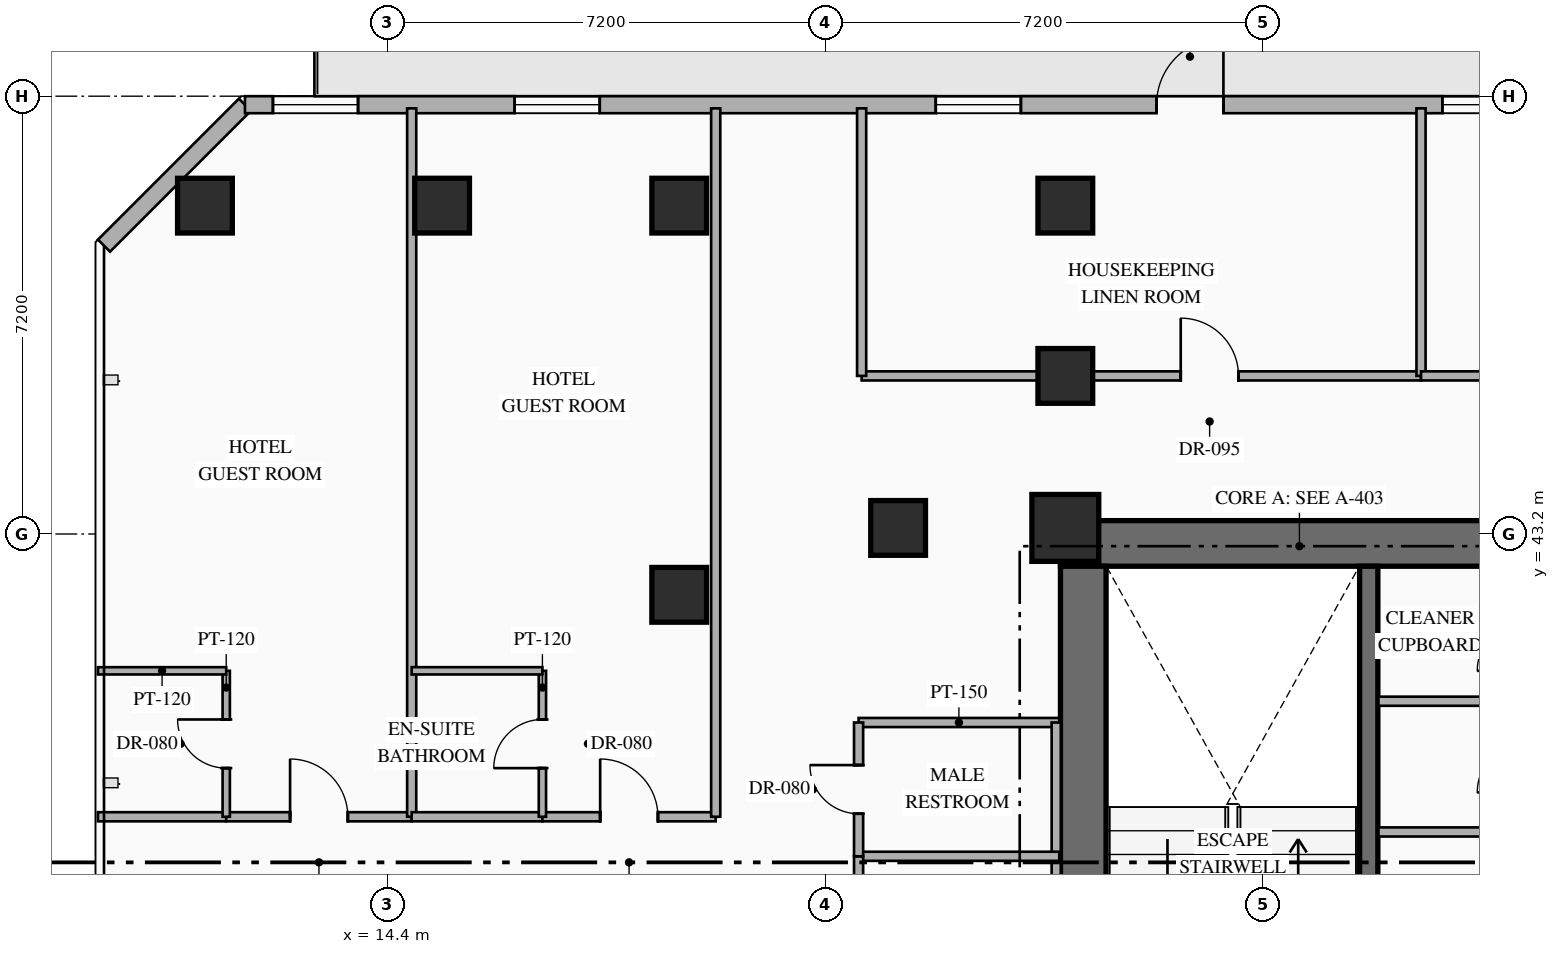
"""IFC4 building model, lengths in metres.
Left out: names, types, materials, properties, quantities, classifications, styles, units other than length and angle.
Written with IfcOpenShell. Run it as: python <this file> out.ifc"""

import sys

from ifc_helpers import new_model, si_unit, direction, frame, frame_2d, origin, origin_2d, place, context, subcontext, project, spatial, rectangle, hollow_rectangle, extrude, element, fill, save


model = new_model("IFC4")
c1 = context("Model", 3, precision=1e-05, world=origin(), true_north=direction((0.0, 1.0)))
c2 = subcontext(c1, "Body", "Model", "MODEL_VIEW")
j1 = project(units=[si_unit("LENGTHUNIT", "METRE"), si_unit("PLANEANGLEUNIT", "RADIAN")], contexts=[c1])
p1 = place(None, origin())
s1 = spatial("IfcSite", under=j1, at=p1, CompositionType="ELEMENT")
p2 = place(p1, origin())
s2 = spatial("IfcBuilding", under=s1, at=p2, CompositionType="ELEMENT")
p3 = place(p2, frame((0.0, 0.0, 81.3)))
s3 = spatial("IfcBuildingStorey", under=s2, at=p3, CompositionType="ELEMENT", Elevation=81.3)
p4 = place(p3, frame((25.47, 43.045, 0.0), z_axis=(0.0, 0.0, 1.0), x_axis=(1.0, 0.0, 0.0)))
e1 = element("IfcWall", 1, at=p4, inside=s3, PredefinedType="SHEAR", context=c2, shape_type="SweptSolid", body=[
    extrude(rectangle(XDim=8.08, YDim=0.75, at=frame_2d((4.04, 0.0))), origin(), (0.0, 0.0, 1.0), 3.35),
])
p5 = place(p3, frame((25.845, 33.19, 0.0), z_axis=(0.0, 0.0, 1.0), x_axis=(0.0, 1.0, 0.0)))
e2 = element("IfcWall", 2, at=p5, inside=s3, PredefinedType="SHEAR", context=c2, shape_type="SweptSolid", body=[
    extrude(rectangle(XDim=9.48, YDim=0.75, at=frame_2d((4.74, 0.0))), origin(), (0.0, 0.0, 1.0), 3.35),
])
p6 = place(p3, frame((30.54, 33.19, 0.0), z_axis=(0.0, 0.0, 1.0), x_axis=(0.0, 1.0, 0.0)))
e3 = element("IfcWall", 3, at=p6, inside=s3, PredefinedType="SHEAR", context=c2, shape_type="SweptSolid", body=[
    extrude(rectangle(XDim=9.48, YDim=0.3, at=frame_2d((4.74, 0.0))), origin(), (0.0, 0.0, 1.0), 3.35),
])
p7 = place(p3, frame((25.55, 43.3, 0.0), z_axis=(0.0, 0.0, 1.0), x_axis=(1.0, 0.0, 0.0)))
e4 = element("IfcColumn", 4, at=p7, inside=s3, PredefinedType="COLUMN", context=c2, shape_type="SweptSolid", body=[
    extrude(rectangle(XDim=1.1, YDim=1.1, at=origin_2d()), origin(), (0.0, 0.0, 1.0), 3.35),
])
for number, where, z_axis, x_axis in (
    (5, (25.55, 45.8, 0.0), (0.0, 0.0, 1.0), (1.0, 0.0, 0.0)),
    (6, (11.4, 48.6, 0.0), (0.0, 0.0, 1.0), (1.0, 0.0, 0.0)),
    (7, (19.2, 48.6, 0.0), (0.0, 0.0, 1.0), (1.0, 0.0, 0.0)),
    (8, (25.55, 48.6, 0.0), (0.0, 0.0, 1.0), (1.0, 0.0, 0.0)),
    (9, (19.2, 42.2, 0.0), (0.0, 0.0, 1.0), (1.0, 0.0, 0.0)),
    (10, (22.8, 43.3, 0.0), (0.0, 0.0, 1.0), (1.0, 0.0, 0.0)),
    (11, (15.3, 48.6, 0.0), (0.0, 0.0, 1.0), (1.0, 0.0, 0.0)),
):
    element("IfcColumn", number, at=place(p3, frame(where, z_axis=z_axis, x_axis=x_axis)), inside=s3, PredefinedType="COLUMN", context=c2, shape_type="SweptSolid", body=[
        extrude(hollow_rectangle(XDim=0.9, YDim=0.9, WallThickness=0.036, at=origin_2d()), origin(), (0.0, 0.0, 1.0), 3.35),
    ])
p8 = place(p3, frame((9.74, 47.942, 0.0), z_axis=(0.0, 0.0, 1.0), x_axis=(0.707106781187, 0.707106781187, 0.0)))
e12 = element("IfcWall", 12, at=p8, inside=s3, PredefinedType="STANDARD", context=c2, shape_type="SweptSolid", body=[
    extrude(rectangle(XDim=3.278, YDim=0.28, at=frame_2d((1.639, 0.0))), origin(), (0.0, 0.0, 1.0), 3.13),
])
p9 = place(p3, frame((12.058, 50.26, 0.0), z_axis=(0.0, 0.0, 1.0), x_axis=(1.0, 0.0, 0.0)))
e13 = element("IfcWall", 13, at=p9, inside=s3, PredefinedType="STANDARD", context=c2, shape_type="SweptSolid", body=[
    extrude(rectangle(XDim=30.484, YDim=0.28, at=frame_2d((15.242, 0.0))), origin(), (0.0, 0.0, 1.0), 3.13),
])
p10 = place(p9, frame((14.992, 0.0, 0.0)))
e14 = element("IfcOpeningElement", 14, at=p10, cuts=e13, PredefinedType="OPENING", context=c2, shape_type="SweptSolid", body=[
    extrude(rectangle(XDim=1.1, YDim=2.2, at=frame_2d((0.55, 1.1))), frame((0.0, 0.15, 0.0), z_axis=(0.0, -1.0, 0.0), x_axis=(1.0, 0.0, 0.0)), (0.0, 0.0, 1.0), 0.3),
])
p11 = place(p9, frame((0.46, 0.0, 0.85)))
e15 = element("IfcOpeningElement", 15, at=p11, cuts=e13, PredefinedType="OPENING", context=c2, shape_type="SweptSolid", body=[
    extrude(rectangle(XDim=1.4, YDim=1.8, at=frame_2d((0.7, 0.9))), frame((0.0, 0.15, 0.0), z_axis=(0.0, -1.0, 0.0), x_axis=(1.0, 0.0, 0.0)), (0.0, 0.0, 1.0), 0.3),
])
p12 = place(p9, frame((4.435, 0.0, 0.85)))
e16 = element("IfcOpeningElement", 16, at=p12, cuts=e13, PredefinedType="OPENING", context=c2, shape_type="SweptSolid", body=[
    extrude(rectangle(XDim=1.4, YDim=1.8, at=frame_2d((0.7, 0.9))), frame((0.0, 0.15, 0.0), z_axis=(0.0, -1.0, 0.0), x_axis=(1.0, 0.0, 0.0)), (0.0, 0.0, 1.0), 0.3),
])
p13 = place(p9, frame((11.361, 0.0, 0.85)))
e17 = element("IfcOpeningElement", 17, at=p13, cuts=e13, PredefinedType="OPENING", context=c2, shape_type="SweptSolid", body=[
    extrude(rectangle(XDim=1.4, YDim=1.8, at=frame_2d((0.7, 0.9))), frame((0.0, 0.15, 0.0), z_axis=(0.0, -1.0, 0.0), x_axis=(1.0, 0.0, 0.0)), (0.0, 0.0, 1.0), 0.3),
])
p14 = place(p9, frame((19.693, 0.0, 0.85)))
e18 = element("IfcOpeningElement", 18, at=p14, cuts=e13, PredefinedType="OPENING", context=c2, shape_type="SweptSolid", body=[
    extrude(rectangle(XDim=1.4, YDim=1.8, at=frame_2d((0.7, 0.9))), frame((0.0, 0.15, 0.0), z_axis=(0.0, -1.0, 0.0), x_axis=(1.0, 0.0, 0.0)), (0.0, 0.0, 1.0), 0.3),
])
p15 = place(p9, frame((23.252, 0.0, 0.85)))
e19 = element("IfcOpeningElement", 19, at=p15, cuts=e13, PredefinedType="OPENING", context=c2, shape_type="SweptSolid", body=[
    extrude(rectangle(XDim=1.4, YDim=1.8, at=frame_2d((0.7, 0.9))), frame((0.0, 0.15, 0.0), z_axis=(0.0, -1.0, 0.0), x_axis=(1.0, 0.0, 0.0)), (0.0, 0.0, 1.0), 0.3),
])
p16 = place(p9, frame((27.417, 0.0, 0.85)))
e20 = element("IfcOpeningElement", 20, at=p16, cuts=e13, PredefinedType="OPENING", context=c2, shape_type="SweptSolid", body=[
    extrude(rectangle(XDim=1.4, YDim=1.8, at=frame_2d((0.7, 0.9))), frame((0.0, 0.15, 0.0), z_axis=(0.0, -1.0, 0.0), x_axis=(1.0, 0.0, 0.0)), (0.0, 0.0, 1.0), 0.3),
])
for number, where, z_axis, x_axis in (
    (21, (30.7, 38.3, 0.0), (0.0, 0.0, 1.0), (1.0, 0.0, 0.0)),
    (22, (30.7, 40.45, 0.0), (0.0, 0.0, 1.0), (1.0, 0.0, 0.0)),
):
    element("IfcWall", number, at=place(p3, frame(where, z_axis=z_axis, x_axis=x_axis)), inside=s3, PredefinedType="PARTITIONING", context=c2, shape_type="SweptSolid", body=[
        extrude(rectangle(XDim=2.1, YDim=0.15, at=frame_2d((1.05, 0.0))), origin(), (0.0, 0.0, 1.0), 3.13),
    ])
p17 = place(p3, frame((22.15, 40.1, 0.0), z_axis=(0.0, 0.0, 1.0), x_axis=(1.0, 0.0, 0.0)))
e23 = element("IfcWall", 23, at=p17, inside=s3, PredefinedType="PARTITIONING", context=c2, shape_type="SweptSolid", body=[
    extrude(rectangle(XDim=3.3, YDim=0.15, at=frame_2d((1.65, 0.0))), origin(), (0.0, 0.0, 1.0), 3.13),
])
p18 = place(p3, frame((25.4, 33.5, 0.0), z_axis=(0.0, 0.0, 1.0), x_axis=(0.0, 1.0, 0.0)))
e24 = element("IfcWall", 24, at=p18, inside=s3, PredefinedType="PARTITIONING", context=c2, shape_type="SweptSolid", body=[
    extrude(rectangle(XDim=6.6, YDim=0.15, at=frame_2d((3.3, 0.0))), origin(), (0.0, 0.0, 1.0), 3.13),
])
p19 = place(p3, frame((22.15, 37.9, 0.0), z_axis=(0.0, 0.0, 1.0), x_axis=(1.0, 0.0, 0.0)))
e25 = element("IfcWall", 25, at=p19, inside=s3, PredefinedType="PARTITIONING", context=c2, shape_type="SweptSolid", body=[
    extrude(rectangle(XDim=3.3, YDim=0.15, at=frame_2d((1.65, 0.0))), origin(), (0.0, 0.0, 1.0), 3.13),
])
p20 = place(p3, frame((22.15, 35.7, 0.0), z_axis=(0.0, 0.0, 1.0), x_axis=(0.0, 1.0, 0.0)))
e26 = element("IfcWall", 26, at=p20, inside=s3, PredefinedType="PARTITIONING", context=c2, shape_type="SweptSolid", body=[
    extrude(rectangle(XDim=2.2, YDim=0.15, at=frame_2d((1.1, 0.0))), origin(), (0.0, 0.0, 1.0), 3.13),
])
p21 = place(p20, frame((0.7, 0.0, 0.0)))
e27 = element("IfcOpeningElement", 27, at=p21, cuts=e26, PredefinedType="OPENING", context=c2, shape_type="SweptSolid", body=[
    extrude(rectangle(XDim=0.8, YDim=2.06, at=frame_2d((0.4, 1.03))), frame((0.0, 0.085, 0.0), z_axis=(0.0, -1.0, 0.0), x_axis=(1.0, 0.0, 0.0)), (0.0, 0.0, 1.0), 0.17),
])
p22 = place(p3, frame((22.15, 37.9, 0.0), z_axis=(0.0, 0.0, 1.0), x_axis=(0.0, 1.0, 0.0)))
e28 = element("IfcWall", 28, at=p22, inside=s3, PredefinedType="PARTITIONING", context=c2, shape_type="SweptSolid", body=[
    extrude(rectangle(XDim=2.2, YDim=0.15, at=frame_2d((1.1, 0.0))), origin(), (0.0, 0.0, 1.0), 3.13),
])
p23 = place(p22, frame((0.7, 0.0, 0.0)))
e29 = element("IfcOpeningElement", 29, at=p23, cuts=e28, PredefinedType="OPENING", context=c2, shape_type="SweptSolid", body=[
    extrude(rectangle(XDim=0.8, YDim=2.06, at=frame_2d((0.4, 1.03))), frame((0.0, 0.085, 0.0), z_axis=(0.0, -1.0, 0.0), x_axis=(1.0, 0.0, 0.0)), (0.0, 0.0, 1.0), 0.17),
])
p24 = place(p3, frame((22.2, 45.8, 0.0), z_axis=(0.0, 0.0, 1.0), x_axis=(1.0, 0.0, 0.0)))
e30 = element("IfcWall", 30, at=p24, inside=s3, PredefinedType="PARTITIONING", context=c2, shape_type="SweptSolid", body=[
    extrude(rectangle(XDim=9.2, YDim=0.15, at=frame_2d((4.6, 0.0))), origin(), (0.0, 0.0, 1.0), 2.425),
])
p25 = place(p24, frame((5.248, 0.0, 0.0)))
e31 = element("IfcOpeningElement", 31, at=p25, cuts=e30, PredefinedType="OPENING", context=c2, shape_type="SweptSolid", body=[
    extrude(rectangle(XDim=0.95, YDim=2.15, at=frame_2d((0.475, 1.075))), frame((0.0, 0.085, 0.0), z_axis=(0.0, -1.0, 0.0), x_axis=(1.0, 0.0, 0.0)), (0.0, 0.0, 1.0), 0.17),
])
for number, where, z_axis, x_axis in (
    (32, (22.2, 45.8, 0.0), (0.0, 0.0, 1.0), (0.0, 1.0, 0.0)),
    (33, (31.4, 45.8, 0.0), (0.0, 0.0, 1.0), (0.0, 1.0, 0.0)),
):
    element("IfcWall", number, at=place(p3, frame(where, z_axis=z_axis, x_axis=x_axis)), inside=s3, PredefinedType="PARTITIONING", context=c2, shape_type="SweptSolid", body=[
        extrude(rectangle(XDim=4.4, YDim=0.15, at=frame_2d((2.2, 0.0))), origin(), (0.0, 0.0, 1.0), 3.13),
    ])
p26 = place(p3, frame((31.4, 45.8, 0.0), z_axis=(0.0, 0.0, 1.0), x_axis=(1.0, 0.0, 0.0)))
e34 = element("IfcWall", 34, at=p26, inside=s3, PredefinedType="PARTITIONING", context=c2, shape_type="SweptSolid", body=[
    extrude(rectangle(XDim=13.0, YDim=0.15, at=frame_2d((6.5, 0.0))), origin(), (0.0, 0.0, 1.0), 2.425),
])
p27 = place(p26, frame((6.025, 0.0, 0.0)))
e35 = element("IfcOpeningElement", 35, at=p27, cuts=e34, PredefinedType="OPENING", context=c2, shape_type="SweptSolid", body=[
    extrude(rectangle(XDim=0.95, YDim=2.15, at=frame_2d((0.475, 1.075))), frame((0.0, 0.085, 0.0), z_axis=(0.0, -1.0, 0.0), x_axis=(1.0, 0.0, 0.0)), (0.0, 0.0, 1.0), 0.17),
])
p28 = place(p3, frame((9.64, 38.55, 0.0), z_axis=(0.0, 0.0, 1.0), x_axis=(1.0, 0.0, 0.0)))
e36 = element("IfcWall", 36, at=p28, inside=s3, PredefinedType="PARTITIONING", context=c2, shape_type="SweptSolid", body=[
    extrude(rectangle(XDim=2.11, YDim=0.15, at=frame_2d((1.055, 0.0))), origin(), (0.0, 0.0, 1.0), 2.775),
])
p29 = place(p3, frame((11.75, 38.55, 0.0), z_axis=(0.0, 0.0, 1.0), x_axis=(1.0, 0.0, 0.0)))
e37 = element("IfcWall", 37, at=p29, inside=s3, PredefinedType="PARTITIONING", context=c2, shape_type="SweptSolid", body=[
    extrude(rectangle(XDim=3.05, YDim=0.15, at=frame_2d((1.525, 0.0))), origin(), (0.0, 0.0, 1.0), 2.775),
])
p30 = place(p29, frame((1.05, 0.0, 0.0)))
e38 = element("IfcOpeningElement", 38, at=p30, cuts=e37, PredefinedType="OPENING", context=c2, shape_type="SweptSolid", body=[
    extrude(rectangle(XDim=0.95, YDim=2.15, at=frame_2d((0.475, 1.075))), frame((0.0, 0.085, 0.0), z_axis=(0.0, -1.0, 0.0), x_axis=(1.0, 0.0, 0.0)), (0.0, 0.0, 1.0), 0.17),
])
p31 = place(p3, frame((11.75, 38.55, 0.0), z_axis=(0.0, 0.0, 1.0), x_axis=(0.0, 1.0, 0.0)))
e39 = element("IfcWall", 39, at=p31, inside=s3, PredefinedType="PARTITIONING", context=c2, shape_type="SweptSolid", body=[
    extrude(rectangle(XDim=2.4, YDim=0.12, at=frame_2d((1.2, 0.0))), origin(), (0.0, 0.0, 1.0), 3.13),
])
p32 = place(p31, frame((0.8, 0.0, 0.0)))
e40 = element("IfcOpeningElement", 40, at=p32, cuts=e39, PredefinedType="OPENING", context=c2, shape_type="SweptSolid", body=[
    extrude(rectangle(XDim=0.8, YDim=2.06, at=frame_2d((0.4, 1.03))), frame((0.0, 0.07, 0.0), z_axis=(0.0, -1.0, 0.0), x_axis=(1.0, 0.0, 0.0)), (0.0, 0.0, 1.0), 0.14),
])
p33 = place(p3, frame((9.64, 40.95, 0.0), z_axis=(0.0, 0.0, 1.0), x_axis=(1.0, 0.0, 0.0)))
e41 = element("IfcWall", 41, at=p33, inside=s3, PredefinedType="PARTITIONING", context=c2, shape_type="SweptSolid", body=[
    extrude(rectangle(XDim=2.11, YDim=0.12, at=frame_2d((1.055, 0.0))), origin(), (0.0, 0.0, 1.0), 2.775),
])
p34 = place(p3, frame((14.8, 38.55, 0.0), z_axis=(0.0, 0.0, 1.0), x_axis=(0.0, 1.0, 0.0)))
e42 = element("IfcWall", 42, at=p34, inside=s3, PredefinedType="PARTITIONING", context=c2, shape_type="SweptSolid", body=[
    extrude(rectangle(XDim=11.65, YDim=0.15, at=frame_2d((5.825, 0.0))), origin(), (0.0, 0.0, 1.0), 3.13),
])
p35 = place(p3, frame((14.8, 38.55, 0.0), z_axis=(0.0, 0.0, 1.0), x_axis=(1.0, 0.0, 0.0)))
e43 = element("IfcWall", 43, at=p35, inside=s3, PredefinedType="PARTITIONING", context=c2, shape_type="SweptSolid", body=[
    extrude(rectangle(XDim=2.15, YDim=0.15, at=frame_2d((1.075, 0.0))), origin(), (0.0, 0.0, 1.0), 2.775),
])
p36 = place(p3, frame((16.95, 38.55, 0.0), z_axis=(0.0, 0.0, 1.0), x_axis=(1.0, 0.0, 0.0)))
e44 = element("IfcWall", 44, at=p36, inside=s3, PredefinedType="PARTITIONING", context=c2, shape_type="SweptSolid", body=[
    extrude(rectangle(XDim=2.85, YDim=0.15, at=frame_2d((1.425, 0.0))), origin(), (0.0, 0.0, 1.0), 2.775),
])
p37 = place(p36, frame((0.95, 0.0, 0.0)))
e45 = element("IfcOpeningElement", 45, at=p37, cuts=e44, PredefinedType="OPENING", context=c2, shape_type="SweptSolid", body=[
    extrude(rectangle(XDim=0.95, YDim=2.15, at=frame_2d((0.475, 1.075))), frame((0.0, 0.085, 0.0), z_axis=(0.0, -1.0, 0.0), x_axis=(1.0, 0.0, 0.0)), (0.0, 0.0, 1.0), 0.17),
])
p38 = place(p3, frame((16.95, 38.55, 0.0), z_axis=(0.0, 0.0, 1.0), x_axis=(0.0, 1.0, 0.0)))
e46 = element("IfcWall", 46, at=p38, inside=s3, PredefinedType="PARTITIONING", context=c2, shape_type="SweptSolid", body=[
    extrude(rectangle(XDim=2.4, YDim=0.12, at=frame_2d((1.2, 0.0))), origin(), (0.0, 0.0, 1.0), 3.13),
])
p39 = place(p38, frame((0.8, 0.0, 0.0)))
e47 = element("IfcOpeningElement", 47, at=p39, cuts=e46, PredefinedType="OPENING", context=c2, shape_type="SweptSolid", body=[
    extrude(rectangle(XDim=0.8, YDim=2.06, at=frame_2d((0.4, 1.03))), frame((0.0, 0.07, 0.0), z_axis=(0.0, -1.0, 0.0), x_axis=(1.0, 0.0, 0.0)), (0.0, 0.0, 1.0), 0.14),
])
p40 = place(p3, frame((14.8, 40.95, 0.0), z_axis=(0.0, 0.0, 1.0), x_axis=(1.0, 0.0, 0.0)))
e48 = element("IfcWall", 48, at=p40, inside=s3, PredefinedType="PARTITIONING", context=c2, shape_type="SweptSolid", body=[
    extrude(rectangle(XDim=2.15, YDim=0.12, at=frame_2d((1.075, 0.0))), origin(), (0.0, 0.0, 1.0), 2.775),
])
p41 = place(p3, frame((19.8, 38.55, 0.0), z_axis=(0.0, 0.0, 1.0), x_axis=(0.0, 1.0, 0.0)))
e49 = element("IfcWall", 49, at=p41, inside=s3, PredefinedType="PARTITIONING", context=c2, shape_type="SweptSolid", body=[
    extrude(rectangle(XDim=11.65, YDim=0.15, at=frame_2d((5.825, 0.0))), origin(), (0.0, 0.0, 1.0), 3.13),
])
p42 = place(p10, origin())
e50 = element("IfcDoor", 50, at=p42, inside=s3, OperationType="SINGLE_SWING_RIGHT", PredefinedType="DOOR", context=c2, shape_type="SweptSolid", body=[
    extrude(rectangle(XDim=1.1, YDim=2.2, at=frame_2d((0.55, 1.1))), frame((0.0, 0.025, 0.0), z_axis=(0.0, -1.0, 0.0), x_axis=(1.0, 0.0, 0.0)), (0.0, 0.0, 1.0), 0.05),
])
fill(e14, e50)
p43 = place(p11, origin())
e51 = element("IfcWindow", 51, at=p43, inside=s3, PartitioningType="SINGLE_PANEL", PredefinedType="WINDOW", context=c2, shape_type="SweptSolid", body=[
    extrude(rectangle(XDim=1.4, YDim=1.8, at=frame_2d((0.7, 0.9))), frame((0.0, 0.03, 0.0), z_axis=(0.0, -1.0, 0.0), x_axis=(1.0, 0.0, 0.0)), (0.0, 0.0, 1.0), 0.06),
])
fill(e15, e51)
p44 = place(p12, origin())
e52 = element("IfcWindow", 52, at=p44, inside=s3, PartitioningType="SINGLE_PANEL", PredefinedType="WINDOW", context=c2, shape_type="SweptSolid", body=[
    extrude(rectangle(XDim=1.4, YDim=1.8, at=frame_2d((0.7, 0.9))), frame((0.0, 0.03, 0.0), z_axis=(0.0, -1.0, 0.0), x_axis=(1.0, 0.0, 0.0)), (0.0, 0.0, 1.0), 0.06),
])
fill(e16, e52)
p45 = place(p13, origin())
e53 = element("IfcWindow", 53, at=p45, inside=s3, PartitioningType="SINGLE_PANEL", PredefinedType="WINDOW", context=c2, shape_type="SweptSolid", body=[
    extrude(rectangle(XDim=1.4, YDim=1.8, at=frame_2d((0.7, 0.9))), frame((0.0, 0.03, 0.0), z_axis=(0.0, -1.0, 0.0), x_axis=(1.0, 0.0, 0.0)), (0.0, 0.0, 1.0), 0.06),
])
fill(e17, e53)
p46 = place(p14, origin())
e54 = element("IfcWindow", 54, at=p46, inside=s3, PartitioningType="SINGLE_PANEL", PredefinedType="WINDOW", context=c2, shape_type="SweptSolid", body=[
    extrude(rectangle(XDim=1.4, YDim=1.8, at=frame_2d((0.7, 0.9))), frame((0.0, 0.03, 0.0), z_axis=(0.0, -1.0, 0.0), x_axis=(1.0, 0.0, 0.0)), (0.0, 0.0, 1.0), 0.06),
])
fill(e18, e54)
p47 = place(p23, origin())
e55 = element("IfcDoor", 55, at=p47, inside=s3, OperationType="SINGLE_SWING_RIGHT", PredefinedType="DOOR", context=c2, shape_type="SweptSolid", body=[
    extrude(rectangle(XDim=0.8, YDim=2.06, at=frame_2d((0.4, 1.03))), frame((0.0, 0.025, 0.0), z_axis=(0.0, -1.0, 0.0), x_axis=(1.0, 0.0, 0.0)), (0.0, 0.0, 1.0), 0.05),
])
fill(e29, e55)
p48 = place(p25, origin())
e56 = element("IfcDoor", 56, at=p48, inside=s3, OperationType="SINGLE_SWING_LEFT", PredefinedType="DOOR", context=c2, shape_type="SweptSolid", body=[
    extrude(rectangle(XDim=0.95, YDim=2.15, at=frame_2d((0.475, 1.075))), frame((0.0, 0.025, 0.0), z_axis=(0.0, -1.0, 0.0), x_axis=(1.0, 0.0, 0.0)), (0.0, 0.0, 1.0), 0.05),
])
fill(e31, e56)
p49 = place(p30, origin())
e57 = element("IfcDoor", 57, at=p49, inside=s3, OperationType="SINGLE_SWING_LEFT", PredefinedType="DOOR", context=c2, shape_type="SweptSolid", body=[
    extrude(rectangle(XDim=0.95, YDim=2.15, at=frame_2d((0.475, 1.075))), frame((0.0, 0.025, 0.0), z_axis=(0.0, -1.0, 0.0), x_axis=(1.0, 0.0, 0.0)), (0.0, 0.0, 1.0), 0.05),
])
fill(e38, e57)
p50 = place(p32, origin())
e58 = element("IfcDoor", 58, at=p50, inside=s3, OperationType="SINGLE_SWING_RIGHT", PredefinedType="DOOR", context=c2, shape_type="SweptSolid", body=[
    extrude(rectangle(XDim=0.8, YDim=2.06, at=frame_2d((0.4, 1.03))), frame((0.0, 0.025, 0.0), z_axis=(0.0, -1.0, 0.0), x_axis=(1.0, 0.0, 0.0)), (0.0, 0.0, 1.0), 0.05),
])
fill(e40, e58)
p51 = place(p37, origin())
e59 = element("IfcDoor", 59, at=p51, inside=s3, OperationType="SINGLE_SWING_LEFT", PredefinedType="DOOR", context=c2, shape_type="SweptSolid", body=[
    extrude(rectangle(XDim=0.95, YDim=2.15, at=frame_2d((0.475, 1.075))), frame((0.0, 0.025, 0.0), z_axis=(0.0, -1.0, 0.0), x_axis=(1.0, 0.0, 0.0)), (0.0, 0.0, 1.0), 0.05),
])
fill(e45, e59)
p52 = place(p39, origin())
e60 = element("IfcDoor", 60, at=p52, inside=s3, OperationType="SINGLE_SWING_LEFT", PredefinedType="DOOR", context=c2, shape_type="SweptSolid", body=[
    extrude(rectangle(XDim=0.8, YDim=2.06, at=frame_2d((0.4, 1.03))), frame((0.0, 0.025, 0.0), z_axis=(0.0, -1.0, 0.0), x_axis=(1.0, 0.0, 0.0)), (0.0, 0.0, 1.0), 0.05),
])
fill(e47, e60)
save(model, sys.argv[1])
